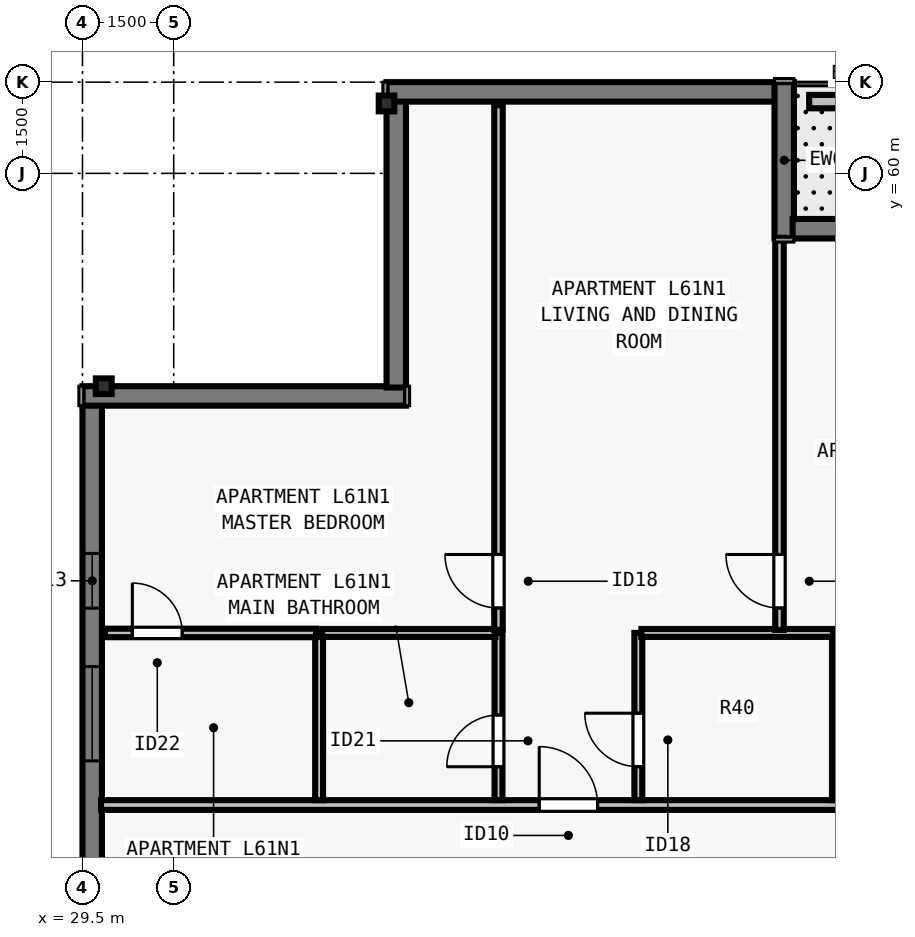
"""IFC4 building model, lengths in metres.
Left out: names, types, materials, properties, quantities, classifications, styles, units other than length and angle.
Written with IfcOpenShell. Run it as: python <this file> out.ifc"""

import sys

from ifc_helpers import new_model, si_unit, direction, frame, frame_2d, origin, origin_2d, place, context, subcontext, project, spatial, rectangle, i_section, extrude, element, fill, save


model = new_model("IFC4")
c1 = context("Model", 3, precision=1e-05, world=origin(), true_north=direction((0.0, 1.0)))
c2 = subcontext(c1, "Body", "Model", "MODEL_VIEW")
j1 = project(units=[si_unit("LENGTHUNIT", "METRE"), si_unit("PLANEANGLEUNIT", "RADIAN")], contexts=[c1])
p1 = place(None, origin())
s1 = spatial("IfcSite", under=j1, at=p1, CompositionType="ELEMENT")
p2 = place(p1, origin())
s2 = spatial("IfcBuilding", under=s1, at=p2, CompositionType="ELEMENT")
p3 = place(p2, frame((0.0, 0.0, 223.5)))
s3 = spatial("IfcBuildingStorey", under=s2, at=p3, CompositionType="ELEMENT", Elevation=223.5)
for number, where, z_axis, x_axis in (
    (1, (34.5, 61.15, 0.0), (0.0, 0.0, 1.0), (1.0, 0.0, 0.0)),
    (2, (29.85, 56.5, 0.0), (0.0, 0.0, 1.0), (0.0, 1.0, 0.0)),
):
    element("IfcColumn", number, at=place(p3, frame(where, z_axis=z_axis, x_axis=x_axis)), inside=s3, PredefinedType="COLUMN", context=c2, shape_type="SweptSolid", body=[
        extrude(i_section(OverallWidth=0.256, OverallDepth=0.26, WebThickness=0.01, FlangeThickness=0.017, FilletRadius=0.013, at=origin_2d()), origin(), (0.0, 0.0, 1.0), 3.5),
    ])
p4 = place(p3, frame((29.66, 21.5, 0.0), z_axis=(0.0, 0.0, 1.0), x_axis=(0.0, 1.0, 0.0)))
e3 = element("IfcWall", 3, at=p4, inside=s3, PredefinedType="SOLIDWALL", context=c2, shape_type="SweptSolid", body=[
    extrude(rectangle(XDim=34.702, YDim=0.32, at=frame_2d((17.351, 0.0))), origin(), (0.0, 0.0, 1.0), 3.29),
])
p5 = place(p4, frame((4.613, 0.0, 0.8)))
e4 = element("IfcOpeningElement", 4, at=p5, cuts=e3, PredefinedType="OPENING", context=c2, shape_type="SweptSolid", body=[
    extrude(rectangle(XDim=1.85, YDim=1.678, at=frame_2d((0.925, 0.839))), frame((0.0, 0.17, 0.0), z_axis=(0.0, -1.0, 0.0), x_axis=(1.0, 0.0, 0.0)), (0.0, 0.0, 1.0), 0.34),
])
p6 = place(p4, frame((9.388, 0.0, 0.8)))
e5 = element("IfcOpeningElement", 5, at=p6, cuts=e3, PredefinedType="OPENING", context=c2, shape_type="SweptSolid", body=[
    extrude(rectangle(XDim=1.55, YDim=1.678, at=frame_2d((0.775, 0.839))), frame((0.0, 0.17, 0.0), z_axis=(0.0, -1.0, 0.0), x_axis=(1.0, 0.0, 0.0)), (0.0, 0.0, 1.0), 0.34),
])
p7 = place(p4, frame((14.888, 0.0, 0.8)))
e6 = element("IfcOpeningElement", 6, at=p7, cuts=e3, PredefinedType="OPENING", context=c2, shape_type="SweptSolid", body=[
    extrude(rectangle(XDim=1.55, YDim=1.678, at=frame_2d((0.775, 0.839))), frame((0.0, 0.17, 0.0), z_axis=(0.0, -1.0, 0.0), x_axis=(1.0, 0.0, 0.0)), (0.0, 0.0, 1.0), 0.34),
])
p8 = place(p4, frame((19.364, 0.0, 0.8)))
e7 = element("IfcOpeningElement", 7, at=p8, cuts=e3, PredefinedType="OPENING", context=c2, shape_type="SweptSolid", body=[
    extrude(rectangle(XDim=1.85, YDim=1.678, at=frame_2d((0.925, 0.839))), frame((0.0, 0.17, 0.0), z_axis=(0.0, -1.0, 0.0), x_axis=(1.0, 0.0, 0.0)), (0.0, 0.0, 1.0), 0.34),
])
p9 = place(p4, frame((23.614, 0.0, 0.8)))
e8 = element("IfcOpeningElement", 8, at=p9, cuts=e3, PredefinedType="OPENING", context=c2, shape_type="SweptSolid", body=[
    extrude(rectangle(XDim=1.85, YDim=1.678, at=frame_2d((0.925, 0.839))), frame((0.0, 0.17, 0.0), z_axis=(0.0, -1.0, 0.0), x_axis=(1.0, 0.0, 0.0)), (0.0, 0.0, 1.0), 0.34),
])
p10 = place(p4, frame((28.839, 0.0, 0.8)))
e9 = element("IfcOpeningElement", 9, at=p10, cuts=e3, PredefinedType="OPENING", context=c2, shape_type="SweptSolid", body=[
    extrude(rectangle(XDim=1.55, YDim=1.678, at=frame_2d((0.775, 0.839))), frame((0.0, 0.17, 0.0), z_axis=(0.0, -1.0, 0.0), x_axis=(1.0, 0.0, 0.0)), (0.0, 0.0, 1.0), 0.34),
])
p11 = place(p4, frame((31.35, 0.0, 0.8)))
e10 = element("IfcOpeningElement", 10, at=p11, cuts=e3, PredefinedType="OPENING", context=c2, shape_type="SweptSolid", body=[
    extrude(rectangle(XDim=0.9, YDim=1.678, at=frame_2d((0.45, 0.839))), frame((0.0, 0.17, 0.0), z_axis=(0.0, -1.0, 0.0), x_axis=(1.0, 0.0, 0.0)), (0.0, 0.0, 1.0), 0.34),
])
p12 = place(p3, frame((29.5, 56.34, 0.0), z_axis=(0.0, 0.0, 1.0), x_axis=(1.0, 0.0, 0.0)))
e11 = element("IfcWall", 11, at=p12, inside=s3, PredefinedType="SOLIDWALL", context=c2, shape_type="SweptSolid", body=[
    extrude(rectangle(XDim=5.32, YDim=0.32, at=frame_2d((2.66, 0.0))), origin(), (0.0, 0.0, 1.0), 3.29),
])
p13 = place(p3, frame((34.66, 56.478, 0.0), z_axis=(0.0, 0.0, 1.0), x_axis=(0.0, 1.0, 0.0)))
e12 = element("IfcWall", 12, at=p13, inside=s3, PredefinedType="SOLIDWALL", context=c2, shape_type="SweptSolid", body=[
    extrude(rectangle(XDim=4.724, YDim=0.32, at=frame_2d((2.362, 0.0))), origin(), (0.0, 0.0, 1.0), 3.29),
])
p14 = place(p3, frame((34.5, 61.34, 0.0), z_axis=(0.0, 0.0, 1.0), x_axis=(1.0, 0.0, 0.0)))
e13 = element("IfcWall", 13, at=p14, inside=s3, PredefinedType="SOLIDWALL", context=c2, shape_type="SweptSolid", body=[
    extrude(rectangle(XDim=6.402, YDim=0.32, at=frame_2d((3.201, 0.0))), origin(), (0.0, 0.0, 1.0), 3.29),
])
p15 = place(p3, frame((41.04, 61.5, 0.0), z_axis=(0.0, 0.0, 1.0), x_axis=(0.0, -1.0, 0.0)))
e14 = element("IfcWall", 14, at=p15, inside=s3, PredefinedType="SOLIDWALL", context=c2, shape_type="SweptSolid", body=[
    extrude(rectangle(XDim=2.57, YDim=0.32, at=frame_2d((1.285, 0.0))), origin(), (0.0, 0.0, 1.0), 3.29),
])
p16 = place(p3, frame((41.178, 59.09, 0.0), z_axis=(0.0, 0.0, 1.0), x_axis=(1.0, 0.0, 0.0)))
e15 = element("IfcWall", 15, at=p16, inside=s3, PredefinedType="SOLIDWALL", context=c2, shape_type="SweptSolid", body=[
    extrude(rectangle(XDim=5.742, YDim=0.32, at=frame_2d((2.871, 0.0))), origin(), (0.0, 0.0, 1.0), 3.29),
])
p17 = place(p16, frame((1.767, 0.0, 0.0)))
e16 = element("IfcOpeningElement", 16, at=p17, cuts=e15, PredefinedType="OPENING", context=c2, shape_type="SweptSolid", body=[
    extrude(rectangle(XDim=1.0, YDim=2.15, at=frame_2d((0.5, 1.075))), frame((0.0, 0.17, 0.0), z_axis=(0.0, -1.0, 0.0), x_axis=(1.0, 0.0, 0.0)), (0.0, 0.0, 1.0), 0.34),
])
p18 = place(p3, frame((41.45, 61.18, 0.0), z_axis=(0.0, 0.0, 1.0), x_axis=(1.0, 0.0, 0.0)))
e17 = element("IfcWall", 17, at=p18, inside=s3, PredefinedType="PARAPET", context=c2, shape_type="SweptSolid", body=[
    extrude(rectangle(XDim=1.3, YDim=0.22, at=frame_2d((0.65, 0.0))), origin(), (0.0, 0.0, 1.0), 0.55),
])
p19 = place(p3, frame((29.805, 49.613, 0.0), z_axis=(0.0, 0.0, 1.0), x_axis=(1.0, 0.0, 0.0)))
e18 = element("IfcWall", 18, at=p19, inside=s3, PredefinedType="PARTITIONING", context=c2, shape_type="SweptSolid", body=[
    extrude(rectangle(XDim=44.39, YDim=0.16, at=frame_2d((22.195, 0.0))), origin(), (0.0, 0.0, 1.0), 2.958),
])
p20 = place(p19, frame((7.206, 0.0, 0.0)))
e19 = element("IfcOpeningElement", 19, at=p20, cuts=e18, PredefinedType="OPENING", context=c2, shape_type="SweptSolid", body=[
    extrude(rectangle(XDim=0.96, YDim=2.18, at=frame_2d((0.48, 1.09))), frame((0.0, 0.09, 0.0), z_axis=(0.0, -1.0, 0.0), x_axis=(1.0, 0.0, 0.0)), (0.0, 0.0, 1.0), 0.18),
])
p21 = place(p19, frame((21.78, 0.0, 0.0)))
e20 = element("IfcOpeningElement", 20, at=p21, cuts=e18, PredefinedType="OPENING", context=c2, shape_type="SweptSolid", body=[
    extrude(rectangle(XDim=0.96, YDim=2.18, at=frame_2d((0.48, 1.09))), frame((0.0, 0.09, 0.0), z_axis=(0.0, -1.0, 0.0), x_axis=(1.0, 0.0, 0.0)), (0.0, 0.0, 1.0), 0.18),
])
p22 = place(p19, frame((36.289, 0.0, 0.0)))
e21 = element("IfcOpeningElement", 21, at=p22, cuts=e18, PredefinedType="OPENING", context=c2, shape_type="SweptSolid", body=[
    extrude(rectangle(XDim=0.96, YDim=2.18, at=frame_2d((0.48, 1.09))), frame((0.0, 0.09, 0.0), z_axis=(0.0, -1.0, 0.0), x_axis=(1.0, 0.0, 0.0)), (0.0, 0.0, 1.0), 0.18),
])
p23 = place(p3, frame((33.391, 49.692, 0.0), z_axis=(0.0, 0.0, 1.0), x_axis=(0.0, 1.0, 0.0)))
e22 = element("IfcWall", 22, at=p23, inside=s3, PredefinedType="PLUMBINGWALL", context=c2, shape_type="SweptSolid", body=[
    extrude(rectangle(XDim=2.75, YDim=0.13, at=frame_2d((1.375, 0.0))), origin(), (0.0, 0.0, 1.0), 3.29),
])
p24 = place(p3, frame((36.341, 49.692, 0.0), z_axis=(0.0, 0.0, 1.0), x_axis=(0.0, 1.0, 0.0)))
e23 = element("IfcWall", 23, at=p24, inside=s3, PredefinedType="PLUMBINGWALL", context=c2, shape_type="SweptSolid", body=[
    extrude(rectangle(XDim=2.75, YDim=0.13, at=frame_2d((1.375, 0.0))), origin(), (0.0, 0.0, 1.0), 3.29),
])
p25 = place(p24, frame((0.55, 0.0, 0.0)))
e24 = element("IfcOpeningElement", 24, at=p25, cuts=e23, PredefinedType="OPENING", context=c2, shape_type="SweptSolid", body=[
    extrude(rectangle(XDim=0.85, YDim=2.08, at=frame_2d((0.425, 1.04))), frame((0.0, 0.075, 0.0), z_axis=(0.0, -1.0, 0.0), x_axis=(1.0, 0.0, 0.0)), (0.0, 0.0, 1.0), 0.15),
])
p26 = place(p3, frame((33.441, 52.442, 0.0), z_axis=(0.0, 0.0, 1.0), x_axis=(1.0, 0.0, 0.0)))
e25 = element("IfcWall", 25, at=p26, inside=s3, PredefinedType="PLUMBINGWALL", context=c2, shape_type="SweptSolid", body=[
    extrude(rectangle(XDim=2.85, YDim=0.13, at=frame_2d((1.425, 0.0))), origin(), (0.0, 0.0, 1.0), 2.958),
])
p27 = place(p3, frame((41.891, 49.692, 0.0), z_axis=(0.0, 0.0, 1.0), x_axis=(0.0, 1.0, 0.0)))
e26 = element("IfcWall", 26, at=p27, inside=s3, PredefinedType="PLUMBINGWALL", context=c2, shape_type="SweptSolid", body=[
    extrude(rectangle(XDim=2.75, YDim=0.13, at=frame_2d((1.375, 0.0))), origin(), (0.0, 0.0, 1.0), 2.573),
])
p28 = place(p3, frame((38.641, 49.692, 0.0), z_axis=(0.0, 0.0, 1.0), x_axis=(0.0, 1.0, 0.0)))
e27 = element("IfcWall", 27, at=p28, inside=s3, PredefinedType="PLUMBINGWALL", context=c2, shape_type="SweptSolid", body=[
    extrude(rectangle(XDim=2.75, YDim=0.13, at=frame_2d((1.375, 0.0))), origin(), (0.0, 0.0, 1.0), 3.29),
])
p29 = place(p28, frame((0.55, 0.0, 0.0)))
e28 = element("IfcOpeningElement", 28, at=p29, cuts=e27, PredefinedType="OPENING", context=c2, shape_type="SweptSolid", body=[
    extrude(rectangle(XDim=0.88, YDim=2.1, at=frame_2d((0.44, 1.05))), frame((0.0, 0.075, 0.0), z_axis=(0.0, -1.0, 0.0), x_axis=(1.0, 0.0, 0.0)), (0.0, 0.0, 1.0), 0.15),
])
p30 = place(p3, frame((38.691, 52.442, 0.0), z_axis=(0.0, 0.0, 1.0), x_axis=(1.0, 0.0, 0.0)))
e29 = element("IfcWall", 29, at=p30, inside=s3, PredefinedType="PLUMBINGWALL", context=c2, shape_type="SweptSolid", body=[
    extrude(rectangle(XDim=3.15, YDim=0.13, at=frame_2d((1.575, 0.0))), origin(), (0.0, 0.0, 1.0), 3.29),
])
p31 = place(p3, frame((36.341, 52.492, 0.0), z_axis=(0.0, 0.0, 1.0), x_axis=(0.0, 1.0, 0.0)))
e30 = element("IfcWall", 30, at=p31, inside=s3, PredefinedType="PARTITIONING", context=c2, shape_type="SweptSolid", body=[
    extrude(rectangle(XDim=8.628, YDim=0.14, at=frame_2d((4.314, 0.0))), origin(), (0.0, 0.0, 1.0), 2.573),
])
p32 = place(p31, frame((0.36, 0.0, 0.0)))
e31 = element("IfcOpeningElement", 31, at=p32, cuts=e30, PredefinedType="OPENING", context=c2, shape_type="SweptSolid", body=[
    extrude(rectangle(XDim=0.88, YDim=2.1, at=frame_2d((0.44, 1.05))), frame((0.0, 0.08, 0.0), z_axis=(0.0, -1.0, 0.0), x_axis=(1.0, 0.0, 0.0)), (0.0, 0.0, 1.0), 0.16),
])
p33 = place(p3, frame((29.87, 52.442, 0.0), z_axis=(0.0, 0.0, 1.0), x_axis=(1.0, 0.0, 0.0)))
e32 = element("IfcWall", 32, at=p33, inside=s3, PredefinedType="PARTITIONING", context=c2, shape_type="SweptSolid", body=[
    extrude(rectangle(XDim=3.471, YDim=0.14, at=frame_2d((1.736, 0.0))), origin(), (0.0, 0.0, 1.0), 3.29),
])
p34 = place(p33, frame((0.45, 0.0, 0.0)))
e33 = element("IfcOpeningElement", 33, at=p34, cuts=e32, PredefinedType="OPENING", context=c2, shape_type="SweptSolid", body=[
    extrude(rectangle(XDim=0.82, YDim=2.1, at=frame_2d((0.41, 1.05))), frame((0.0, 0.08, 0.0), z_axis=(0.0, -1.0, 0.0), x_axis=(1.0, 0.0, 0.0)), (0.0, 0.0, 1.0), 0.16),
])
p35 = place(p3, frame((40.962, 52.492, 0.0), z_axis=(0.0, 0.0, 1.0), x_axis=(0.0, 1.0, 0.0)))
e34 = element("IfcWall", 34, at=p35, inside=s3, PredefinedType="PARTITIONING", context=c2, shape_type="SweptSolid", body=[
    extrude(rectangle(XDim=6.448, YDim=0.14, at=frame_2d((3.224, 0.0))), origin(), (0.0, 0.0, 1.0), 3.29),
])
p36 = place(p35, frame((0.36, 0.0, 0.0)))
e35 = element("IfcOpeningElement", 35, at=p36, cuts=e34, PredefinedType="OPENING", context=c2, shape_type="SweptSolid", body=[
    extrude(rectangle(XDim=0.88, YDim=2.1, at=frame_2d((0.44, 1.05))), frame((0.0, 0.08, 0.0), z_axis=(0.0, -1.0, 0.0), x_axis=(1.0, 0.0, 0.0)), (0.0, 0.0, 1.0), 0.16),
])
p37 = place(p10, origin())
e36 = element("IfcWindow", 36, at=p37, inside=s3, PartitioningType="SINGLE_PANEL", PredefinedType="WINDOW", context=c2, shape_type="SweptSolid", body=[
    extrude(rectangle(XDim=1.55, YDim=1.678, at=frame_2d((0.775, 0.839))), frame((0.0, -0.05, 0.0), z_axis=(0.0, -1.0, 0.0), x_axis=(1.0, 0.0, 0.0)), (0.0, 0.0, 1.0), 0.06),
])
fill(e9, e36)
p38 = place(p11, origin())
e37 = element("IfcWindow", 37, at=p38, inside=s3, PartitioningType="SINGLE_PANEL", PredefinedType="WINDOW", context=c2, shape_type="SweptSolid", body=[
    extrude(rectangle(XDim=0.9, YDim=1.678, at=frame_2d((0.45, 0.839))), frame((0.0, -0.04, 0.0), z_axis=(0.0, -1.0, 0.0), x_axis=(1.0, 0.0, 0.0)), (0.0, 0.0, 1.0), 0.06),
])
fill(e10, e37)
p39 = place(p25, origin())
e38 = element("IfcDoor", 38, at=p39, inside=s3, OperationType="SINGLE_SWING_LEFT", PredefinedType="DOOR", context=c2, shape_type="SweptSolid", body=[
    extrude(rectangle(XDim=0.85, YDim=2.08, at=frame_2d((0.425, 1.04))), frame((0.0, 0.025, 0.0), z_axis=(0.0, -1.0, 0.0), x_axis=(1.0, 0.0, 0.0)), (0.0, 0.0, 1.0), 0.05),
])
fill(e24, e38)
p40 = place(p29, origin())
e39 = element("IfcDoor", 39, at=p40, inside=s3, OperationType="SINGLE_SWING_RIGHT", PredefinedType="DOOR", context=c2, shape_type="SweptSolid", body=[
    extrude(rectangle(XDim=0.88, YDim=2.1, at=frame_2d((0.44, 1.05))), frame((0.0, 0.025, 0.0), z_axis=(0.0, -1.0, 0.0), x_axis=(1.0, 0.0, 0.0)), (0.0, 0.0, 1.0), 0.05),
])
fill(e28, e39)
p41 = place(p34, origin())
e40 = element("IfcDoor", 40, at=p41, inside=s3, OperationType="SINGLE_SWING_LEFT", PredefinedType="DOOR", context=c2, shape_type="SweptSolid", body=[
    extrude(rectangle(XDim=0.82, YDim=2.1, at=frame_2d((0.41, 1.05))), frame((0.0, 0.025, 0.0), z_axis=(0.0, -1.0, 0.0), x_axis=(1.0, 0.0, 0.0)), (0.0, 0.0, 1.0), 0.05),
])
fill(e33, e40)
p42 = place(p32, origin())
e41 = element("IfcDoor", 41, at=p42, inside=s3, OperationType="SINGLE_SWING_RIGHT", PredefinedType="DOOR", context=c2, shape_type="SweptSolid", body=[
    extrude(rectangle(XDim=0.88, YDim=2.1, at=frame_2d((0.44, 1.05))), frame((0.0, 0.025, 0.0), z_axis=(0.0, -1.0, 0.0), x_axis=(1.0, 0.0, 0.0)), (0.0, 0.0, 1.0), 0.05),
])
fill(e31, e41)
p43 = place(p36, origin())
e42 = element("IfcDoor", 42, at=p43, inside=s3, OperationType="SINGLE_SWING_RIGHT", PredefinedType="DOOR", context=c2, shape_type="SweptSolid", body=[
    extrude(rectangle(XDim=0.88, YDim=2.1, at=frame_2d((0.44, 1.05))), frame((0.0, 0.025, 0.0), z_axis=(0.0, -1.0, 0.0), x_axis=(1.0, 0.0, 0.0)), (0.0, 0.0, 1.0), 0.05),
])
fill(e35, e42)
p44 = place(p20, origin())
e43 = element("IfcDoor", 43, at=p44, inside=s3, OperationType="SINGLE_SWING_LEFT", PredefinedType="DOOR", context=c2, shape_type="SweptSolid", body=[
    extrude(rectangle(XDim=0.96, YDim=2.18, at=frame_2d((0.48, 1.09))), frame((0.0, 0.025, 0.0), z_axis=(0.0, -1.0, 0.0), x_axis=(1.0, 0.0, 0.0)), (0.0, 0.0, 1.0), 0.05),
])
fill(e19, e43)
save(model, sys.argv[1])
